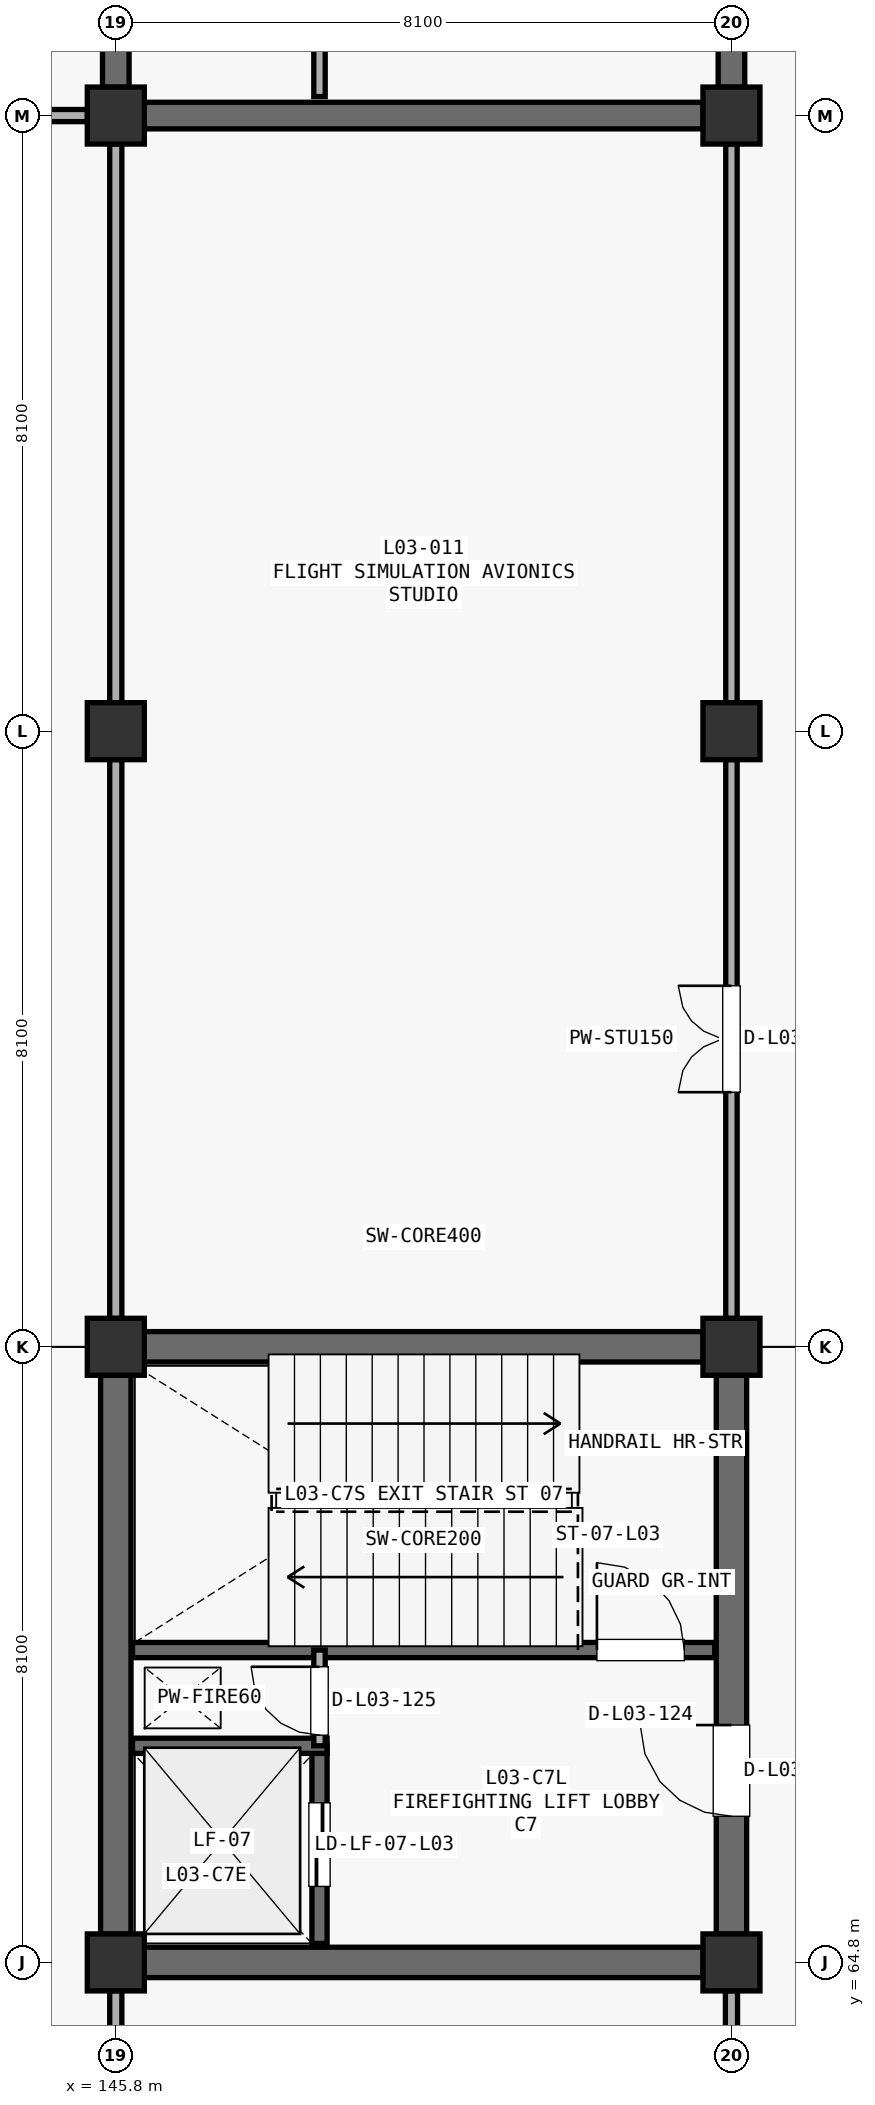
"""IFC4 building model, lengths in metres.
Left out: names, types, materials, properties, quantities, classifications, styles, units other than length and angle.
Written with IfcOpenShell. Run it as: python <this file> out.ifc"""

import sys

from ifc_helpers import new_model, si_unit, direction, frame, frame_2d, origin, origin_2d, place, context, subcontext, project, spatial, rectangle, extrude, element, fill, save


model = new_model("IFC4")
c1 = context("Model", 3, precision=1e-05, world=origin(), true_north=direction((0.0, 1.0)))
c2 = subcontext(c1, "Body", "Model", "MODEL_VIEW")
j1 = project(units=[si_unit("LENGTHUNIT", "METRE"), si_unit("PLANEANGLEUNIT", "RADIAN")], contexts=[c1])
p1 = place(None, origin())
s1 = spatial("IfcSite", under=j1, at=p1, CompositionType="ELEMENT")
p2 = place(p1, origin())
s2 = spatial("IfcBuilding", under=s1, at=p2, CompositionType="ELEMENT")
p3 = place(p2, frame((0.0, 0.0, 14.11)))
s3 = spatial("IfcBuildingStorey", under=s2, at=p3, CompositionType="ELEMENT", Elevation=14.11)
for number, where, z_axis, x_axis in (
    (1, (145.8, 64.8, 0.0), (0.0, 0.0, 1.0), (1.0, 0.0, 0.0)),
    (2, (145.8, 72.9, 0.0), (0.0, 0.0, 1.0), (1.0, 0.0, 0.0)),
    (3, (145.8, 81.0, 0.0), (0.0, 0.0, 1.0), (1.0, 0.0, 0.0)),
    (4, (145.8, 89.1, 0.0), (0.0, 0.0, 1.0), (1.0, 0.0, 0.0)),
    (5, (153.9, 64.8, 0.0), (0.0, 0.0, 1.0), (1.0, 0.0, 0.0)),
    (6, (153.9, 72.9, 0.0), (0.0, 0.0, 1.0), (1.0, 0.0, 0.0)),
    (7, (153.9, 81.0, 0.0), (0.0, 0.0, 1.0), (1.0, 0.0, 0.0)),
    (8, (153.9, 89.1, 0.0), (0.0, 0.0, 1.0), (1.0, 0.0, 0.0)),
):
    element("IfcColumn", number, at=place(p3, frame(where, z_axis=z_axis, x_axis=x_axis)), inside=s3, PredefinedType="COLUMN", context=c2, shape_type="SweptSolid", body=[
        extrude(rectangle(XDim=0.75, YDim=0.75, at=origin_2d()), origin(), (0.0, 0.0, 1.0), 4.42),
    ])
for number, where, z_axis, x_axis in (
    (9, (146.173, 72.9, 0.0), (0.0, 0.0, 1.0), (1.0, 0.0, 0.0)),
    (10, (145.8, 65.173, 0.0), (0.0, 0.0, 1.0), (0.0, 1.0, 0.0)),
):
    element("IfcWall", number, at=place(p3, frame(where, z_axis=z_axis, x_axis=x_axis)), inside=s3, PredefinedType="SHEAR", context=c2, shape_type="SweptSolid", body=[
        extrude(rectangle(XDim=7.354, YDim=0.4, at=frame_2d((3.677, 0.0))), origin(), (0.0, 0.0, 1.0), 4.162),
    ])
p4 = place(p3, frame((153.9, 65.173, 0.0), z_axis=(0.0, 0.0, 1.0), x_axis=(0.0, 1.0, 0.0)))
e11 = element("IfcWall", 11, at=p4, inside=s3, PredefinedType="SHEAR", context=c2, shape_type="SweptSolid", body=[
    extrude(rectangle(XDim=7.354, YDim=0.4, at=frame_2d((3.677, 0.0))), origin(), (0.0, 0.0, 1.0), 4.162),
])
p5 = place(p4, frame((1.55, 0.0, 0.0)))
e12 = element("IfcOpeningElement", 12, at=p5, cuts=e11, PredefinedType="OPENING", context=c2, shape_type="SweptSolid", body=[
    extrude(rectangle(XDim=1.2, YDim=2.2, at=frame_2d((0.6, 1.1))), frame((0.0, 0.21, 0.0), z_axis=(0.0, -1.0, 0.0), x_axis=(1.0, 0.0, 0.0)), (0.0, 0.0, 1.0), 0.42),
])
p6 = place(p3, frame((146.173, 64.8, 0.0), z_axis=(0.0, 0.0, 1.0), x_axis=(1.0, 0.0, 0.0)))
e13 = element("IfcWall", 13, at=p6, inside=s3, PredefinedType="SHEAR", context=c2, shape_type="SweptSolid", body=[
    extrude(rectangle(XDim=7.354, YDim=0.4, at=frame_2d((3.677, 0.0))), origin(), (0.0, 0.0, 1.0), 4.162),
])
p7 = place(p3, frame((146.02, 68.91, 0.0), z_axis=(0.0, 0.0, 1.0), x_axis=(1.0, 0.0, 0.0)))
e14 = element("IfcWall", 14, at=p7, inside=s3, PredefinedType="SHEAR", context=c2, shape_type="SweptSolid", body=[
    extrude(rectangle(XDim=7.66, YDim=0.2, at=frame_2d((3.83, 0.0))), origin(), (0.0, 0.0, 1.0), 4.162),
])
p8 = place(p7, frame((6.11, 0.0, 0.0)))
e15 = element("IfcOpeningElement", 15, at=p8, cuts=e14, PredefinedType="OPENING", context=c2, shape_type="SweptSolid", body=[
    extrude(rectangle(XDim=1.15, YDim=2.2, at=frame_2d((0.575, 1.1))), frame((0.0, 0.11, 0.0), z_axis=(0.0, -1.0, 0.0), x_axis=(1.0, 0.0, 0.0)), (0.0, 0.0, 1.0), 0.22),
])
p9 = place(p3, frame((148.48, 65.05, 0.0), z_axis=(0.0, 0.0, 1.0), x_axis=(0.0, 1.0, 0.0)))
e16 = element("IfcWall", 16, at=p9, inside=s3, PredefinedType="SHEAR", context=c2, shape_type="SweptSolid", body=[
    extrude(rectangle(XDim=2.6, YDim=0.2, at=frame_2d((1.3, 0.0))), origin(), (0.0, 0.0, 1.0), 4.162),
])
p10 = place(p9, frame((0.75, 0.0, 0.0)))
e17 = element("IfcOpeningElement", 17, at=p10, cuts=e16, PredefinedType="OPENING", context=c2, shape_type="SweptSolid", body=[
    extrude(rectangle(XDim=1.1, YDim=2.2, at=frame_2d((0.55, 1.1))), frame((0.0, 0.11, 0.0), z_axis=(0.0, -1.0, 0.0), x_axis=(1.0, 0.0, 0.0)), (0.0, 0.0, 1.0), 0.22),
])
p11 = place(p3, frame((146.02, 67.65, 0.0), z_axis=(0.0, 0.0, 1.0), x_axis=(1.0, 0.0, 0.0)))
e18 = element("IfcWall", 18, at=p11, inside=s3, PredefinedType="SHEAR", context=c2, shape_type="SweptSolid", body=[
    extrude(rectangle(XDim=2.56, YDim=0.2, at=frame_2d((1.28, 0.0))), origin(), (0.0, 0.0, 1.0), 4.162),
])
p12 = place(p3, frame((148.48, 67.65, 0.0), z_axis=(0.0, 0.0, 1.0), x_axis=(0.0, 1.0, 0.0)))
e19 = element("IfcWall", 19, at=p12, inside=s3, PredefinedType="PARTITIONING", context=c2, shape_type="SweptSolid", body=[
    extrude(rectangle(XDim=1.26, YDim=0.15, at=frame_2d((0.63, 0.0))), origin(), (0.0, 0.0, 1.0), 4.162),
])
p13 = place(p12, frame((0.14, 0.0, 0.0)))
e20 = element("IfcOpeningElement", 20, at=p13, cuts=e19, PredefinedType="OPENING", context=c2, shape_type="SweptSolid", body=[
    extrude(rectangle(XDim=0.9, YDim=2.15, at=frame_2d((0.45, 1.075))), frame((0.0, 0.085, 0.0), z_axis=(0.0, -1.0, 0.0), x_axis=(1.0, 0.0, 0.0)), (0.0, 0.0, 1.0), 0.17),
])
p14 = place(p3, frame((145.8, 89.473, 0.0), z_axis=(0.0, 0.0, 1.0), x_axis=(0.0, 1.0, 0.0)))
e21 = element("IfcWall", 21, at=p14, inside=s3, PredefinedType="SHEAR", context=c2, shape_type="SweptSolid", body=[
    extrude(rectangle(XDim=7.354, YDim=0.35, at=frame_2d((3.677, 0.0))), origin(), (0.0, 0.0, 1.0), 4.162),
])
p15 = place(p3, frame((153.9, 89.473, 0.0), z_axis=(0.0, 0.0, 1.0), x_axis=(0.0, 1.0, 0.0)))
e22 = element("IfcWall", 22, at=p15, inside=s3, PredefinedType="SHEAR", context=c2, shape_type="SweptSolid", body=[
    extrude(rectangle(XDim=7.354, YDim=0.35, at=frame_2d((3.677, 0.0))), origin(), (0.0, 0.0, 1.0), 4.162),
])
p16 = place(p15, frame((1.55, 0.0, 0.0)))
e23 = element("IfcOpeningElement", 23, at=p16, cuts=e22, PredefinedType="OPENING", context=c2, shape_type="SweptSolid", body=[
    extrude(rectangle(XDim=1.2, YDim=2.2, at=frame_2d((0.6, 1.1))), frame((0.0, 0.185, 0.0), z_axis=(0.0, -1.0, 0.0), x_axis=(1.0, 0.0, 0.0)), (0.0, 0.0, 1.0), 0.37),
])
p17 = place(p3, frame((146.173, 89.1, 0.0), z_axis=(0.0, 0.0, 1.0), x_axis=(1.0, 0.0, 0.0)))
e24 = element("IfcWall", 24, at=p17, inside=s3, PredefinedType="SHEAR", context=c2, shape_type="SweptSolid", body=[
    extrude(rectangle(XDim=7.354, YDim=0.35, at=frame_2d((3.677, 0.0))), origin(), (0.0, 0.0, 1.0), 4.162),
])
p18 = place(p3, frame((148.48, 89.35, 0.0), z_axis=(0.0, 0.0, 1.0), x_axis=(0.0, 1.0, 0.0)))
e25 = element("IfcWall", 25, at=p18, inside=s3, PredefinedType="PARTITIONING", context=c2, shape_type="SweptSolid", body=[
    extrude(rectangle(XDim=2.6, YDim=0.15, at=frame_2d((1.3, 0.0))), origin(), (0.0, 0.0, 1.0), 4.162),
])
p19 = place(p18, frame((0.8, 0.0, 0.0)))
e26 = element("IfcOpeningElement", 26, at=p19, cuts=e25, PredefinedType="OPENING", context=c2, shape_type="SweptSolid", body=[
    extrude(rectangle(XDim=0.95, YDim=2.15, at=frame_2d((0.475, 1.075))), frame((0.0, 0.085, 0.0), z_axis=(0.0, -1.0, 0.0), x_axis=(1.0, 0.0, 0.0)), (0.0, 0.0, 1.0), 0.17),
])
p20 = place(p3, frame((145.8, 57.073, 0.0), z_axis=(0.0, 0.0, 1.0), x_axis=(0.0, 1.0, 0.0)))
e27 = element("IfcWall", 27, at=p20, inside=s3, PredefinedType="PARTITIONING", context=c2, shape_type="SweptSolid", body=[
    extrude(rectangle(XDim=7.354, YDim=0.16, at=frame_2d((3.677, 0.0))), origin(), (0.0, 0.0, 1.0), 3.562),
])
p21 = place(p20, frame((2.887, 0.0, 0.0)))
e28 = element("IfcOpeningElement", 28, at=p21, cuts=e27, PredefinedType="OPENING", context=c2, shape_type="SweptSolid", body=[
    extrude(rectangle(XDim=1.58, YDim=2.2, at=frame_2d((0.79, 1.1))), frame((0.0, 0.09, 0.0), z_axis=(0.0, -1.0, 0.0), x_axis=(1.0, 0.0, 0.0)), (0.0, 0.0, 1.0), 0.18),
])
p22 = place(p3, frame((145.8, 73.273, 0.0), z_axis=(0.0, 0.0, 1.0), x_axis=(0.0, 1.0, 0.0)))
e29 = element("IfcWall", 29, at=p22, inside=s3, PredefinedType="PARTITIONING", context=c2, shape_type="SweptSolid", body=[
    extrude(rectangle(XDim=7.354, YDim=0.16, at=frame_2d((3.677, 0.0))), origin(), (0.0, 0.0, 1.0), 3.212),
])
p23 = place(p3, frame((145.8, 81.373, 0.0), z_axis=(0.0, 0.0, 1.0), x_axis=(0.0, 1.0, 0.0)))
e30 = element("IfcWall", 30, at=p23, inside=s3, PredefinedType="PARTITIONING", context=c2, shape_type="SweptSolid", body=[
    extrude(rectangle(XDim=7.354, YDim=0.16, at=frame_2d((3.677, 0.0))), origin(), (0.0, 0.0, 1.0), 3.412),
])
p24 = place(p3, frame((138.073, 89.1, 0.0), z_axis=(0.0, 0.0, 1.0), x_axis=(1.0, 0.0, 0.0)))
e31 = element("IfcWall", 31, at=p24, inside=s3, PredefinedType="PARTITIONING", context=c2, shape_type="SweptSolid", body=[
    extrude(rectangle(XDim=7.354, YDim=0.16, at=frame_2d((3.677, 0.0))), origin(), (0.0, 0.0, 1.0), 3.562),
])
p25 = place(p3, frame((153.9, 73.273, 0.0), z_axis=(0.0, 0.0, 1.0), x_axis=(0.0, 1.0, 0.0)))
e32 = element("IfcWall", 32, at=p25, inside=s3, PredefinedType="PARTITIONING", context=c2, shape_type="SweptSolid", body=[
    extrude(rectangle(XDim=7.354, YDim=0.15, at=frame_2d((3.677, 0.0))), origin(), (0.0, 0.0, 1.0), 3.512),
])
p26 = place(p25, frame((2.977, 0.0, 0.0)))
e33 = element("IfcOpeningElement", 33, at=p26, cuts=e32, PredefinedType="OPENING", context=c2, shape_type="SweptSolid", body=[
    extrude(rectangle(XDim=1.4, YDim=2.2, at=frame_2d((0.7, 1.1))), frame((0.0, 0.085, 0.0), z_axis=(0.0, -1.0, 0.0), x_axis=(1.0, 0.0, 0.0)), (0.0, 0.0, 1.0), 0.17),
])
p27 = place(p3, frame((153.9, 81.373, 0.0), z_axis=(0.0, 0.0, 1.0), x_axis=(0.0, 1.0, 0.0)))
e34 = element("IfcWall", 34, at=p27, inside=s3, PredefinedType="PARTITIONING", context=c2, shape_type="SweptSolid", body=[
    extrude(rectangle(XDim=7.354, YDim=0.15, at=frame_2d((3.677, 0.0))), origin(), (0.0, 0.0, 1.0), 3.562),
])
p28 = place(p3, frame((153.9, 57.073, 0.0), z_axis=(0.0, 0.0, 1.0), x_axis=(0.0, 1.0, 0.0)))
e35 = element("IfcWall", 35, at=p28, inside=s3, PredefinedType="PARTITIONING", context=c2, shape_type="SweptSolid", body=[
    extrude(rectangle(XDim=7.354, YDim=0.16, at=frame_2d((3.677, 0.0))), origin(), (0.0, 0.0, 1.0), 3.212),
])
p29 = place(p28, frame((2.817, 0.0, 0.0)))
e36 = element("IfcOpeningElement", 36, at=p29, cuts=e35, PredefinedType="OPENING", context=c2, shape_type="SweptSolid", body=[
    extrude(rectangle(XDim=1.72, YDim=2.3, at=frame_2d((0.86, 1.15))), frame((0.0, 0.09, 0.0), z_axis=(0.0, -1.0, 0.0), x_axis=(1.0, 0.0, 0.0)), (0.0, 0.0, 1.0), 0.18),
])
p30 = place(p5, origin())
e37 = element("IfcDoor", 37, at=p30, inside=s3, OperationType="SINGLE_SWING_RIGHT", PredefinedType="DOOR", context=c2, shape_type="SweptSolid", body=[
    extrude(rectangle(XDim=1.2, YDim=2.2, at=frame_2d((0.6, 1.1))), frame((0.0, 0.025, 0.0), z_axis=(0.0, -1.0, 0.0), x_axis=(1.0, 0.0, 0.0)), (0.0, 0.0, 1.0), 0.05),
])
fill(e12, e37)
p31 = place(p8, origin())
e38 = element("IfcDoor", 38, at=p31, inside=s3, OperationType="SINGLE_SWING_LEFT", PredefinedType="DOOR", context=c2, shape_type="SweptSolid", body=[
    extrude(rectangle(XDim=1.15, YDim=2.2, at=frame_2d((0.575, 1.1))), frame((0.0, 0.025, 0.0), z_axis=(0.0, -1.0, 0.0), x_axis=(1.0, 0.0, 0.0)), (0.0, 0.0, 1.0), 0.05),
])
fill(e15, e38)
p32 = place(p10, origin())
e39 = element("IfcDoor", 39, at=p32, inside=s3, OperationType="SLIDING_TO_LEFT", PredefinedType="DOOR", context=c2, shape_type="SweptSolid", body=[
    extrude(rectangle(XDim=1.1, YDim=2.2, at=frame_2d((0.55, 1.1))), frame((0.0, 0.025, 0.0), z_axis=(0.0, -1.0, 0.0), x_axis=(1.0, 0.0, 0.0)), (0.0, 0.0, 1.0), 0.05),
])
fill(e17, e39)
p33 = place(p13, origin())
e40 = element("IfcDoor", 40, at=p33, inside=s3, OperationType="SINGLE_SWING_RIGHT", PredefinedType="DOOR", context=c2, shape_type="SweptSolid", body=[
    extrude(rectangle(XDim=0.9, YDim=2.15, at=frame_2d((0.45, 1.075))), frame((0.0, 0.025, 0.0), z_axis=(0.0, -1.0, 0.0), x_axis=(1.0, 0.0, 0.0)), (0.0, 0.0, 1.0), 0.05),
])
fill(e20, e40)
p34 = place(p26, origin())
e41 = element("IfcDoor", 41, at=p34, inside=s3, OperationType="DOUBLE_SWING_LEFT", PredefinedType="DOOR", context=c2, shape_type="SweptSolid", body=[
    extrude(rectangle(XDim=1.4, YDim=2.2, at=frame_2d((0.7, 1.1))), frame((0.0, 0.025, 0.0), z_axis=(0.0, -1.0, 0.0), x_axis=(1.0, 0.0, 0.0)), (0.0, 0.0, 1.0), 0.05),
])
fill(e33, e41)
save(model, sys.argv[1])
